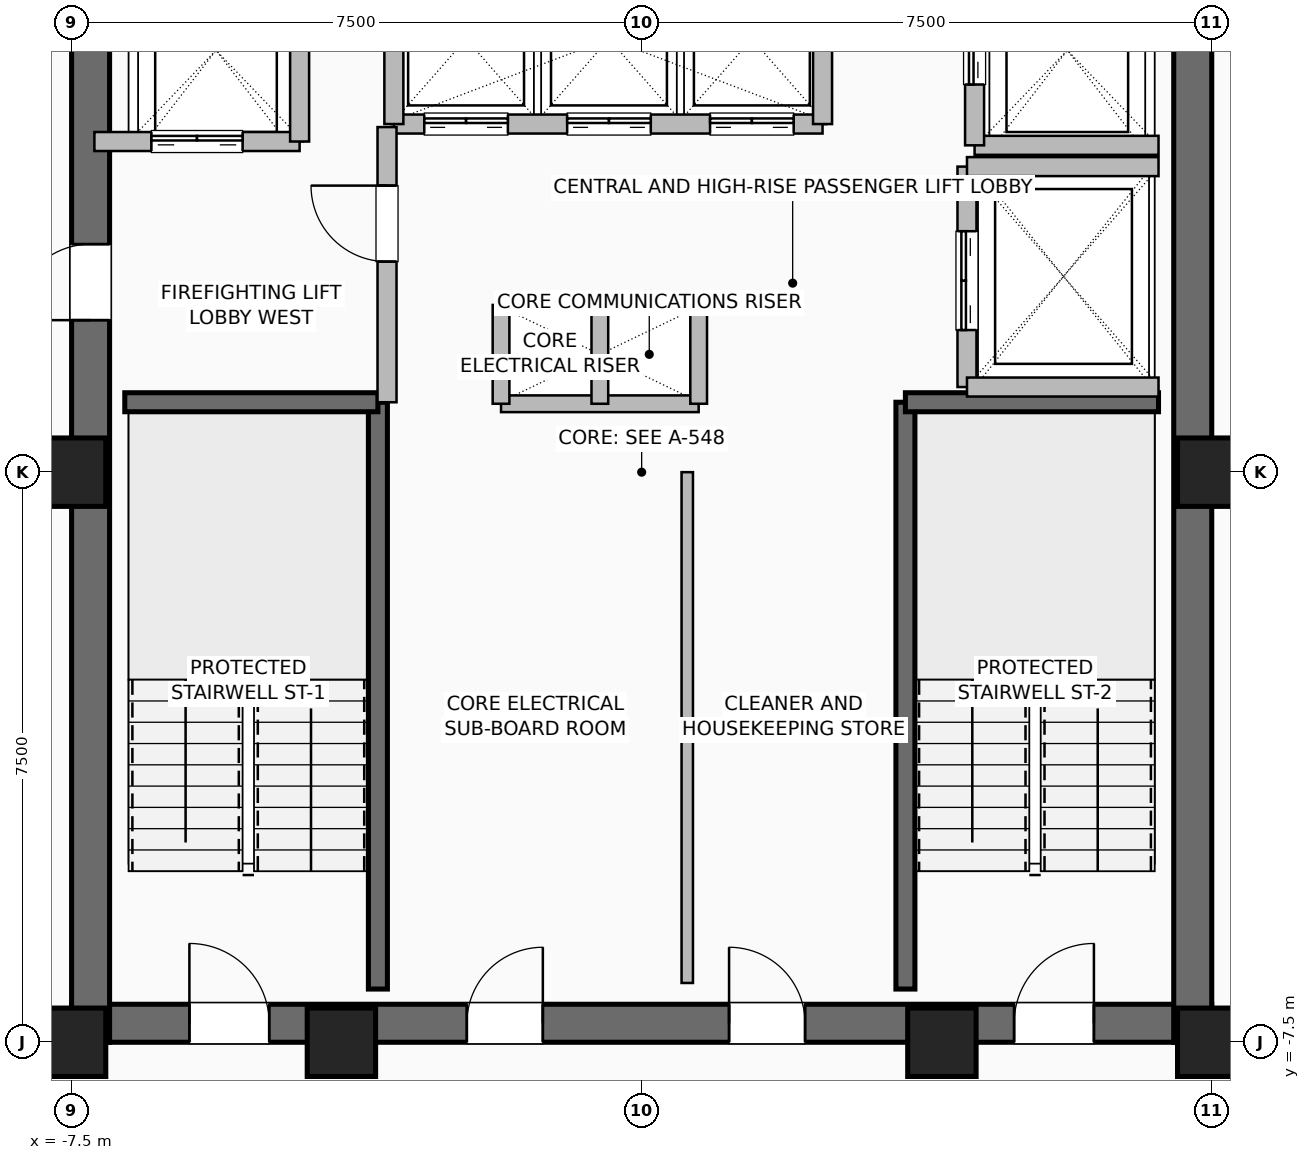
"""IFC4 building model, lengths in metres.
Left out: names, types, materials, properties, quantities, classifications, styles, units other than length and angle.
Written with IfcOpenShell. Run it as: python <this file> out.ifc"""

import sys

from ifc_helpers import new_model, si_unit, direction, frame, frame_2d, origin, origin_2d, place, context, subcontext, project, spatial, rectangle, hollow_rectangle, extrude, element, fill, save


model = new_model("IFC4")
c1 = context("Model", 3, precision=1e-05, world=origin(), true_north=direction((0.0, 1.0)))
c2 = subcontext(c1, "Body", "Model", "MODEL_VIEW")
j1 = project(units=[si_unit("LENGTHUNIT", "METRE"), si_unit("PLANEANGLEUNIT", "RADIAN")], contexts=[c1])
p1 = place(None, origin())
s1 = spatial("IfcSite", under=j1, at=p1, CompositionType="ELEMENT")
p2 = place(p1, origin())
s2 = spatial("IfcBuilding", under=s1, at=p2, CompositionType="ELEMENT")
p3 = place(p2, frame((0.0, 0.0, 184.2)))
s3 = spatial("IfcBuildingStorey", under=s2, at=p3, CompositionType="ELEMENT", Elevation=184.2)
for number, where, z_axis, x_axis in (
    (1, (-7.5, -7.5, 0.0), (0.0, 0.0, 1.0), (1.0, 0.0, 0.0)),
    (2, (-3.95, -7.5, 0.0), (0.0, 0.0, 1.0), (1.0, 0.0, 0.0)),
    (3, (3.95, -7.5, 0.0), (0.0, 0.0, 1.0), (1.0, 0.0, 0.0)),
    (4, (7.5, -7.5, 0.0), (0.0, 0.0, 1.0), (1.0, 0.0, 0.0)),
    (5, (7.5, 0.0, 0.0), (0.0, 0.0, 1.0), (1.0, 0.0, 0.0)),
    (6, (-7.5, 0.0, 0.0), (0.0, 0.0, 1.0), (1.0, 0.0, 0.0)),
):
    element("IfcColumn", number, at=place(p3, frame(where, z_axis=z_axis, x_axis=x_axis)), inside=s3, PredefinedType="COLUMN", context=c2, shape_type="SweptSolid", body=[
        extrude(hollow_rectangle(XDim=0.9, YDim=0.9, WallThickness=0.045, at=origin_2d()), origin(), (0.0, 0.0, 1.0), 3.6),
    ])
p4 = place(p3, frame((-7.5, -7.25, 0.0), z_axis=(0.0, 0.0, 1.0), x_axis=(1.0, 0.0, 0.0)))
e7 = element("IfcWall", 7, at=p4, inside=s3, PredefinedType="SHEAR", context=c2, shape_type="SweptSolid", body=[
    extrude(rectangle(XDim=15.0, YDim=0.5, at=frame_2d((7.5, 0.0))), origin(), (0.0, 0.0, 1.0), 3.36),
])
p5 = place(p4, frame((1.55, 0.0, 0.0)))
e8 = element("IfcOpeningElement", 8, at=p5, cuts=e7, PredefinedType="OPENING", context=c2, shape_type="SweptSolid", body=[
    extrude(rectangle(XDim=1.05, YDim=2.08, at=frame_2d((0.525, 1.04))), frame((0.0, 0.26, 0.0), z_axis=(0.0, -1.0, 0.0), x_axis=(1.0, 0.0, 0.0)), (0.0, 0.0, 1.0), 0.52),
])
p6 = place(p4, frame((12.4, 0.0, 0.0)))
e9 = element("IfcOpeningElement", 9, at=p6, cuts=e7, PredefinedType="OPENING", context=c2, shape_type="SweptSolid", body=[
    extrude(rectangle(XDim=1.05, YDim=2.08, at=frame_2d((0.525, 1.04))), frame((0.0, 0.26, 0.0), z_axis=(0.0, -1.0, 0.0), x_axis=(1.0, 0.0, 0.0)), (0.0, 0.0, 1.0), 0.52),
])
p7 = place(p4, frame((5.2, 0.0, 0.0)))
e10 = element("IfcOpeningElement", 10, at=p7, cuts=e7, PredefinedType="OPENING", context=c2, shape_type="SweptSolid", body=[
    extrude(rectangle(XDim=1.0, YDim=2.08, at=frame_2d((0.5, 1.04))), frame((0.0, 0.26, 0.0), z_axis=(0.0, -1.0, 0.0), x_axis=(1.0, 0.0, 0.0)), (0.0, 0.0, 1.0), 0.52),
])
p8 = place(p4, frame((8.65, 0.0, 0.0)))
e11 = element("IfcOpeningElement", 11, at=p8, cuts=e7, PredefinedType="OPENING", context=c2, shape_type="SweptSolid", body=[
    extrude(rectangle(XDim=1.0, YDim=2.08, at=frame_2d((0.5, 1.04))), frame((0.0, 0.26, 0.0), z_axis=(0.0, -1.0, 0.0), x_axis=(1.0, 0.0, 0.0)), (0.0, 0.0, 1.0), 0.52),
])
p9 = place(p3, frame((-7.25, -7.5, 0.0), z_axis=(0.0, 0.0, 1.0), x_axis=(0.0, 1.0, 0.0)))
e12 = element("IfcWall", 12, at=p9, inside=s3, PredefinedType="SHEAR", context=c2, shape_type="SweptSolid", body=[
    extrude(rectangle(XDim=15.0, YDim=0.5, at=frame_2d((7.5, 0.0))), origin(), (0.0, 0.0, 1.0), 3.36),
])
p10 = place(p9, frame((9.5, 0.0, 0.0)))
e13 = element("IfcOpeningElement", 13, at=p10, cuts=e12, PredefinedType="OPENING", context=c2, shape_type="SweptSolid", body=[
    extrude(rectangle(XDim=1.0, YDim=2.08, at=frame_2d((0.5, 1.04))), frame((0.0, 0.26, 0.0), z_axis=(0.0, -1.0, 0.0), x_axis=(1.0, 0.0, 0.0)), (0.0, 0.0, 1.0), 0.52),
])
p11 = place(p3, frame((7.25, -7.5, 0.0), z_axis=(0.0, 0.0, 1.0), x_axis=(0.0, 1.0, 0.0)))
e14 = element("IfcWall", 14, at=p11, inside=s3, PredefinedType="SHEAR", context=c2, shape_type="SweptSolid", body=[
    extrude(rectangle(XDim=15.0, YDim=0.5, at=frame_2d((7.5, 0.0))), origin(), (0.0, 0.0, 1.0), 3.36),
])
p12 = place(p3, frame((-3.47, -6.8, 0.0), z_axis=(0.0, 0.0, 1.0), x_axis=(0.0, 1.0, 0.0)))
e15 = element("IfcWall", 15, at=p12, inside=s3, PredefinedType="SHEAR", context=c2, shape_type="SweptSolid", body=[
    extrude(rectangle(XDim=7.72, YDim=0.25, at=frame_2d((3.86, 0.0))), origin(), (0.0, 0.0, 1.0), 3.36),
])
p13 = place(p3, frame((-6.8, 0.92, 0.0), z_axis=(0.0, 0.0, 1.0), x_axis=(1.0, 0.0, 0.0)))
e16 = element("IfcWall", 16, at=p13, inside=s3, PredefinedType="SHEAR", context=c2, shape_type="SweptSolid", body=[
    extrude(rectangle(XDim=3.33, YDim=0.25, at=frame_2d((1.665, 0.0))), origin(), (0.0, 0.0, 1.0), 3.36),
])
p14 = place(p3, frame((3.47, -6.8, 0.0), z_axis=(0.0, 0.0, 1.0), x_axis=(0.0, 1.0, 0.0)))
e17 = element("IfcWall", 17, at=p14, inside=s3, PredefinedType="SHEAR", context=c2, shape_type="SweptSolid", body=[
    extrude(rectangle(XDim=7.72, YDim=0.25, at=frame_2d((3.86, 0.0))), origin(), (0.0, 0.0, 1.0), 3.36),
])
p15 = place(p3, frame((3.47, 0.92, 0.0), z_axis=(0.0, 0.0, 1.0), x_axis=(1.0, 0.0, 0.0)))
e18 = element("IfcWall", 18, at=p15, inside=s3, PredefinedType="SHEAR", context=c2, shape_type="SweptSolid", body=[
    extrude(rectangle(XDim=3.33, YDim=0.25, at=frame_2d((1.665, 0.0))), origin(), (0.0, 0.0, 1.0), 3.36),
])
for number, where, z_axis, x_axis in (
    (19, (-1.85, 2.2, 0.0), (0.0, 0.0, 1.0), (1.0, 0.0, 0.0)),
    (20, (-1.85, 0.9, 0.0), (0.0, 0.0, 1.0), (1.0, 0.0, 0.0)),
):
    element("IfcWall", number, at=place(p3, frame(where, z_axis=z_axis, x_axis=x_axis)), inside=s3, PredefinedType="PARTITIONING", context=c2, shape_type="SweptSolid", body=[
        extrude(rectangle(XDim=2.6, YDim=0.22, at=frame_2d((1.3, 0.0))), origin(), (0.0, 0.0, 1.0), 3.36),
    ])
for number, where, z_axis, x_axis in (
    (21, (-0.55, 0.9, 0.0), (0.0, 0.0, 1.0), (0.0, 1.0, 0.0)),
    (22, (0.75, 0.9, 0.0), (0.0, 0.0, 1.0), (0.0, 1.0, 0.0)),
    (23, (-1.85, 0.9, 0.0), (0.0, 0.0, 1.0), (0.0, 1.0, 0.0)),
):
    element("IfcWall", number, at=place(p3, frame(where, z_axis=z_axis, x_axis=x_axis)), inside=s3, PredefinedType="PARTITIONING", context=c2, shape_type="SweptSolid", body=[
        extrude(rectangle(XDim=1.3, YDim=0.22, at=frame_2d((0.65, 0.0))), origin(), (0.0, 0.0, 1.0), 3.36),
    ])
p16 = place(p3, frame((-3.26, 4.58, 0.0), z_axis=(0.0, 0.0, 1.0), x_axis=(1.0, 0.0, 0.0)))
e24 = element("IfcWall", 24, at=p16, inside=s3, PredefinedType="SHEAR", context=c2, shape_type="SweptSolid", body=[
    extrude(rectangle(XDim=5.64, YDim=0.25, at=frame_2d((2.82, 0.0))), origin(), (0.0, 0.0, 1.0), 3.36),
])
p17 = place(p16, frame((0.4, 0.0, 0.0)))
e25 = element("IfcOpeningElement", 25, at=p17, cuts=e24, PredefinedType="OPENING", context=c2, shape_type="SweptSolid", body=[
    extrude(rectangle(XDim=1.1, YDim=2.2, at=frame_2d((0.55, 1.1))), frame((0.0, 0.135, 0.0), z_axis=(0.0, -1.0, 0.0), x_axis=(1.0, 0.0, 0.0)), (0.0, 0.0, 1.0), 0.27),
])
p18 = place(p16, frame((2.28, 0.0, 0.0)))
e26 = element("IfcOpeningElement", 26, at=p18, cuts=e24, PredefinedType="OPENING", context=c2, shape_type="SweptSolid", body=[
    extrude(rectangle(XDim=1.1, YDim=2.2, at=frame_2d((0.55, 1.1))), frame((0.0, 0.135, 0.0), z_axis=(0.0, -1.0, 0.0), x_axis=(1.0, 0.0, 0.0)), (0.0, 0.0, 1.0), 0.27),
])
p19 = place(p16, frame((4.16, 0.0, 0.0)))
e27 = element("IfcOpeningElement", 27, at=p19, cuts=e24, PredefinedType="OPENING", context=c2, shape_type="SweptSolid", body=[
    extrude(rectangle(XDim=1.1, YDim=2.2, at=frame_2d((0.55, 1.1))), frame((0.0, 0.135, 0.0), z_axis=(0.0, -1.0, 0.0), x_axis=(1.0, 0.0, 0.0)), (0.0, 0.0, 1.0), 0.27),
])
for number, where, z_axis, x_axis in (
    (28, (-3.26, 4.58, 0.0), (0.0, 0.0, 1.0), (0.0, 1.0, 0.0)),
    (29, (2.38, 4.58, 0.0), (0.0, 0.0, 1.0), (0.0, 1.0, 0.0)),
):
    element("IfcWall", number, at=place(p3, frame(where, z_axis=z_axis, x_axis=x_axis)), inside=s3, PredefinedType="SHEAR", context=c2, shape_type="SweptSolid", body=[
        extrude(rectangle(XDim=2.22, YDim=0.25, at=frame_2d((1.11, 0.0))), origin(), (0.0, 0.0, 1.0), 3.36),
    ])
p20 = place(p3, frame((-7.2, 4.35, 0.0), z_axis=(0.0, 0.0, 1.0), x_axis=(1.0, 0.0, 0.0)))
e30 = element("IfcWall", 30, at=p20, inside=s3, PredefinedType="SHEAR", context=c2, shape_type="SweptSolid", body=[
    extrude(rectangle(XDim=2.7, YDim=0.25, at=frame_2d((1.35, 0.0))), origin(), (0.0, 0.0, 1.0), 3.36),
])
p21 = place(p20, frame((0.75, 0.0, 0.0)))
e31 = element("IfcOpeningElement", 31, at=p21, cuts=e30, PredefinedType="OPENING", context=c2, shape_type="SweptSolid", body=[
    extrude(rectangle(XDim=1.2, YDim=2.2, at=frame_2d((0.6, 1.1))), frame((0.0, 0.135, 0.0), z_axis=(0.0, -1.0, 0.0), x_axis=(1.0, 0.0, 0.0)), (0.0, 0.0, 1.0), 0.27),
])
p22 = place(p3, frame((-4.5, 4.35, 0.0), z_axis=(0.0, 0.0, 1.0), x_axis=(0.0, 1.0, 0.0)))
e32 = element("IfcWall", 32, at=p22, inside=s3, PredefinedType="SHEAR", context=c2, shape_type="SweptSolid", body=[
    extrude(rectangle(XDim=2.85, YDim=0.25, at=frame_2d((1.425, 0.0))), origin(), (0.0, 0.0, 1.0), 3.36),
])
p23 = place(p3, frame((4.38, 4.3, 0.0), z_axis=(0.0, 0.0, 1.0), x_axis=(1.0, 0.0, 0.0)))
e33 = element("IfcWall", 33, at=p23, inside=s3, PredefinedType="SHEAR", context=c2, shape_type="SweptSolid", body=[
    extrude(rectangle(XDim=2.42, YDim=0.25, at=frame_2d((1.21, 0.0))), origin(), (0.0, 0.0, 1.0), 3.36),
])
p24 = place(p3, frame((4.38, 4.3, 0.0), z_axis=(0.0, 0.0, 1.0), x_axis=(0.0, 1.0, 0.0)))
e34 = element("IfcWall", 34, at=p24, inside=s3, PredefinedType="SHEAR", context=c2, shape_type="SweptSolid", body=[
    extrude(rectangle(XDim=2.5, YDim=0.25, at=frame_2d((1.25, 0.0))), origin(), (0.0, 0.0, 1.0), 3.36),
])
p25 = place(p24, frame((0.8, 0.0, 0.0)))
e35 = element("IfcOpeningElement", 35, at=p25, cuts=e34, PredefinedType="OPENING", context=c2, shape_type="SweptSolid", body=[
    extrude(rectangle(XDim=1.2, YDim=2.2, at=frame_2d((0.6, 1.1))), frame((0.0, 0.135, 0.0), z_axis=(0.0, -1.0, 0.0), x_axis=(1.0, 0.0, 0.0)), (0.0, 0.0, 1.0), 0.27),
])
p26 = place(p3, frame((4.28, 1.12, 0.0), z_axis=(0.0, 0.0, 1.0), x_axis=(0.0, 1.0, 0.0)))
e36 = element("IfcWall", 36, at=p26, inside=s3, PredefinedType="SHEAR", context=c2, shape_type="SweptSolid", body=[
    extrude(rectangle(XDim=2.9, YDim=0.25, at=frame_2d((1.45, 0.0))), origin(), (0.0, 0.0, 1.0), 3.36),
])
p27 = place(p26, frame((0.75, 0.0, 0.0)))
e37 = element("IfcOpeningElement", 37, at=p27, cuts=e36, PredefinedType="OPENING", context=c2, shape_type="SweptSolid", body=[
    extrude(rectangle(XDim=1.3, YDim=2.3, at=frame_2d((0.65, 1.15))), frame((0.0, 0.135, 0.0), z_axis=(0.0, -1.0, 0.0), x_axis=(1.0, 0.0, 0.0)), (0.0, 0.0, 1.0), 0.27),
])
for number, where, z_axis, x_axis in (
    (38, (4.28, 1.12, 0.0), (0.0, 0.0, 1.0), (1.0, 0.0, 0.0)),
    (39, (4.28, 4.02, 0.0), (0.0, 0.0, 1.0), (1.0, 0.0, 0.0)),
):
    element("IfcWall", number, at=place(p3, frame(where, z_axis=z_axis, x_axis=x_axis)), inside=s3, PredefinedType="SHEAR", context=c2, shape_type="SweptSolid", body=[
        extrude(rectangle(XDim=2.52, YDim=0.25, at=frame_2d((1.26, 0.0))), origin(), (0.0, 0.0, 1.0), 3.36),
    ])
p28 = place(p3, frame((-3.35, 0.92, 0.0), z_axis=(0.0, 0.0, 1.0), x_axis=(0.0, 1.0, 0.0)))
e40 = element("IfcWall", 40, at=p28, inside=s3, PredefinedType="SHEAR", context=c2, shape_type="SweptSolid", body=[
    extrude(rectangle(XDim=3.62, YDim=0.25, at=frame_2d((1.81, 0.0))), origin(), (0.0, 0.0, 1.0), 3.36),
])
p29 = place(p28, frame((1.85, 0.0, 0.0)))
e41 = element("IfcOpeningElement", 41, at=p29, cuts=e40, PredefinedType="OPENING", context=c2, shape_type="SweptSolid", body=[
    extrude(rectangle(XDim=1.0, YDim=2.08, at=frame_2d((0.5, 1.04))), frame((0.0, 0.135, 0.0), z_axis=(0.0, -1.0, 0.0), x_axis=(1.0, 0.0, 0.0)), (0.0, 0.0, 1.0), 0.27),
])
p30 = place(p3, frame((0.6, -6.72, 0.0), z_axis=(0.0, 0.0, 1.0), x_axis=(0.0, 1.0, 0.0)))
e42 = element("IfcWall", 42, at=p30, inside=s3, PredefinedType="PARTITIONING", context=c2, shape_type="SweptSolid", body=[
    extrude(rectangle(XDim=6.72, YDim=0.15, at=frame_2d((3.36, 0.0))), origin(), (0.0, 0.0, 1.0), 3.36),
])
p31 = place(p3, frame((7.45, -7.48, 0.0), z_axis=(0.0, 0.0, 1.0), x_axis=(1.0, 0.0, 0.0)))
e43 = element("IfcWall", 43, at=p31, inside=s3, PredefinedType="PARTITIONING", context=c2, shape_type="SweptSolid", body=[
    extrude(rectangle(XDim=0.95, YDim=0.15, at=frame_2d((0.475, 0.0))), origin(), (0.0, 0.0, 1.0), 3.36),
])
p32 = place(p5, origin())
e44 = element("IfcDoor", 44, at=p32, inside=s3, OperationType="SINGLE_SWING_LEFT", PredefinedType="DOOR", context=c2, shape_type="SweptSolid", body=[
    extrude(rectangle(XDim=1.05, YDim=2.08, at=frame_2d((0.525, 1.04))), frame((0.0, 0.025, 0.0), z_axis=(0.0, -1.0, 0.0), x_axis=(1.0, 0.0, 0.0)), (0.0, 0.0, 1.0), 0.05),
])
fill(e8, e44)
p33 = place(p6, origin())
e45 = element("IfcDoor", 45, at=p33, inside=s3, OperationType="SINGLE_SWING_RIGHT", PredefinedType="DOOR", context=c2, shape_type="SweptSolid", body=[
    extrude(rectangle(XDim=1.05, YDim=2.08, at=frame_2d((0.525, 1.04))), frame((0.0, 0.025, 0.0), z_axis=(0.0, -1.0, 0.0), x_axis=(1.0, 0.0, 0.0)), (0.0, 0.0, 1.0), 0.05),
])
fill(e9, e45)
p34 = place(p10, origin())
e46 = element("IfcDoor", 46, at=p34, inside=s3, OperationType="SINGLE_SWING_LEFT", PredefinedType="DOOR", context=c2, shape_type="SweptSolid", body=[
    extrude(rectangle(XDim=1.0, YDim=2.08, at=frame_2d((0.5, 1.04))), frame((0.0, 0.025, 0.0), z_axis=(0.0, -1.0, 0.0), x_axis=(1.0, 0.0, 0.0)), (0.0, 0.0, 1.0), 0.05),
])
fill(e13, e46)
p35 = place(p7, origin())
e47 = element("IfcDoor", 47, at=p35, inside=s3, OperationType="SINGLE_SWING_RIGHT", PredefinedType="DOOR", context=c2, shape_type="SweptSolid", body=[
    extrude(rectangle(XDim=1.0, YDim=2.08, at=frame_2d((0.5, 1.04))), frame((0.0, 0.025, 0.0), z_axis=(0.0, -1.0, 0.0), x_axis=(1.0, 0.0, 0.0)), (0.0, 0.0, 1.0), 0.05),
])
fill(e10, e47)
p36 = place(p8, origin())
e48 = element("IfcDoor", 48, at=p36, inside=s3, OperationType="SINGLE_SWING_LEFT", PredefinedType="DOOR", context=c2, shape_type="SweptSolid", body=[
    extrude(rectangle(XDim=1.0, YDim=2.08, at=frame_2d((0.5, 1.04))), frame((0.0, 0.025, 0.0), z_axis=(0.0, -1.0, 0.0), x_axis=(1.0, 0.0, 0.0)), (0.0, 0.0, 1.0), 0.05),
])
fill(e11, e48)
p37 = place(p17, origin())
e49 = element("IfcDoor", 49, at=p37, inside=s3, OperationType="DOUBLE_DOOR_SLIDING", PredefinedType="DOOR", context=c2, shape_type="SweptSolid", body=[
    extrude(rectangle(XDim=1.1, YDim=2.2, at=frame_2d((0.55, 1.1))), frame((0.0, 0.025, 0.0), z_axis=(0.0, -1.0, 0.0), x_axis=(1.0, 0.0, 0.0)), (0.0, 0.0, 1.0), 0.05),
])
fill(e25, e49)
p38 = place(p18, origin())
e50 = element("IfcDoor", 50, at=p38, inside=s3, OperationType="DOUBLE_DOOR_SLIDING", PredefinedType="DOOR", context=c2, shape_type="SweptSolid", body=[
    extrude(rectangle(XDim=1.1, YDim=2.2, at=frame_2d((0.55, 1.1))), frame((0.0, 0.025, 0.0), z_axis=(0.0, -1.0, 0.0), x_axis=(1.0, 0.0, 0.0)), (0.0, 0.0, 1.0), 0.05),
])
fill(e26, e50)
p39 = place(p19, origin())
e51 = element("IfcDoor", 51, at=p39, inside=s3, OperationType="DOUBLE_DOOR_SLIDING", PredefinedType="DOOR", context=c2, shape_type="SweptSolid", body=[
    extrude(rectangle(XDim=1.1, YDim=2.2, at=frame_2d((0.55, 1.1))), frame((0.0, 0.025, 0.0), z_axis=(0.0, -1.0, 0.0), x_axis=(1.0, 0.0, 0.0)), (0.0, 0.0, 1.0), 0.05),
])
fill(e27, e51)
p40 = place(p21, origin())
e52 = element("IfcDoor", 52, at=p40, inside=s3, OperationType="DOUBLE_DOOR_SLIDING", PredefinedType="DOOR", context=c2, shape_type="SweptSolid", body=[
    extrude(rectangle(XDim=1.2, YDim=2.2, at=frame_2d((0.6, 1.1))), frame((0.0, 0.025, 0.0), z_axis=(0.0, -1.0, 0.0), x_axis=(1.0, 0.0, 0.0)), (0.0, 0.0, 1.0), 0.05),
])
fill(e31, e52)
p41 = place(p25, origin())
e53 = element("IfcDoor", 53, at=p41, inside=s3, OperationType="DOUBLE_DOOR_SLIDING", PredefinedType="DOOR", context=c2, shape_type="SweptSolid", body=[
    extrude(rectangle(XDim=1.2, YDim=2.2, at=frame_2d((0.6, 1.1))), frame((0.0, 0.025, 0.0), z_axis=(0.0, -1.0, 0.0), x_axis=(1.0, 0.0, 0.0)), (0.0, 0.0, 1.0), 0.05),
])
fill(e35, e53)
p42 = place(p27, origin())
e54 = element("IfcDoor", 54, at=p42, inside=s3, OperationType="DOUBLE_DOOR_SLIDING", PredefinedType="DOOR", context=c2, shape_type="SweptSolid", body=[
    extrude(rectangle(XDim=1.3, YDim=2.3, at=frame_2d((0.65, 1.15))), frame((0.0, 0.025, 0.0), z_axis=(0.0, -1.0, 0.0), x_axis=(1.0, 0.0, 0.0)), (0.0, 0.0, 1.0), 0.05),
])
fill(e37, e54)
p43 = place(p29, origin())
e55 = element("IfcDoor", 55, at=p43, inside=s3, OperationType="SINGLE_SWING_RIGHT", PredefinedType="DOOR", context=c2, shape_type="SweptSolid", body=[
    extrude(rectangle(XDim=1.0, YDim=2.08, at=frame_2d((0.5, 1.04))), frame((0.0, 0.025, 0.0), z_axis=(0.0, -1.0, 0.0), x_axis=(1.0, 0.0, 0.0)), (0.0, 0.0, 1.0), 0.05),
])
fill(e41, e55)
save(model, sys.argv[1])
